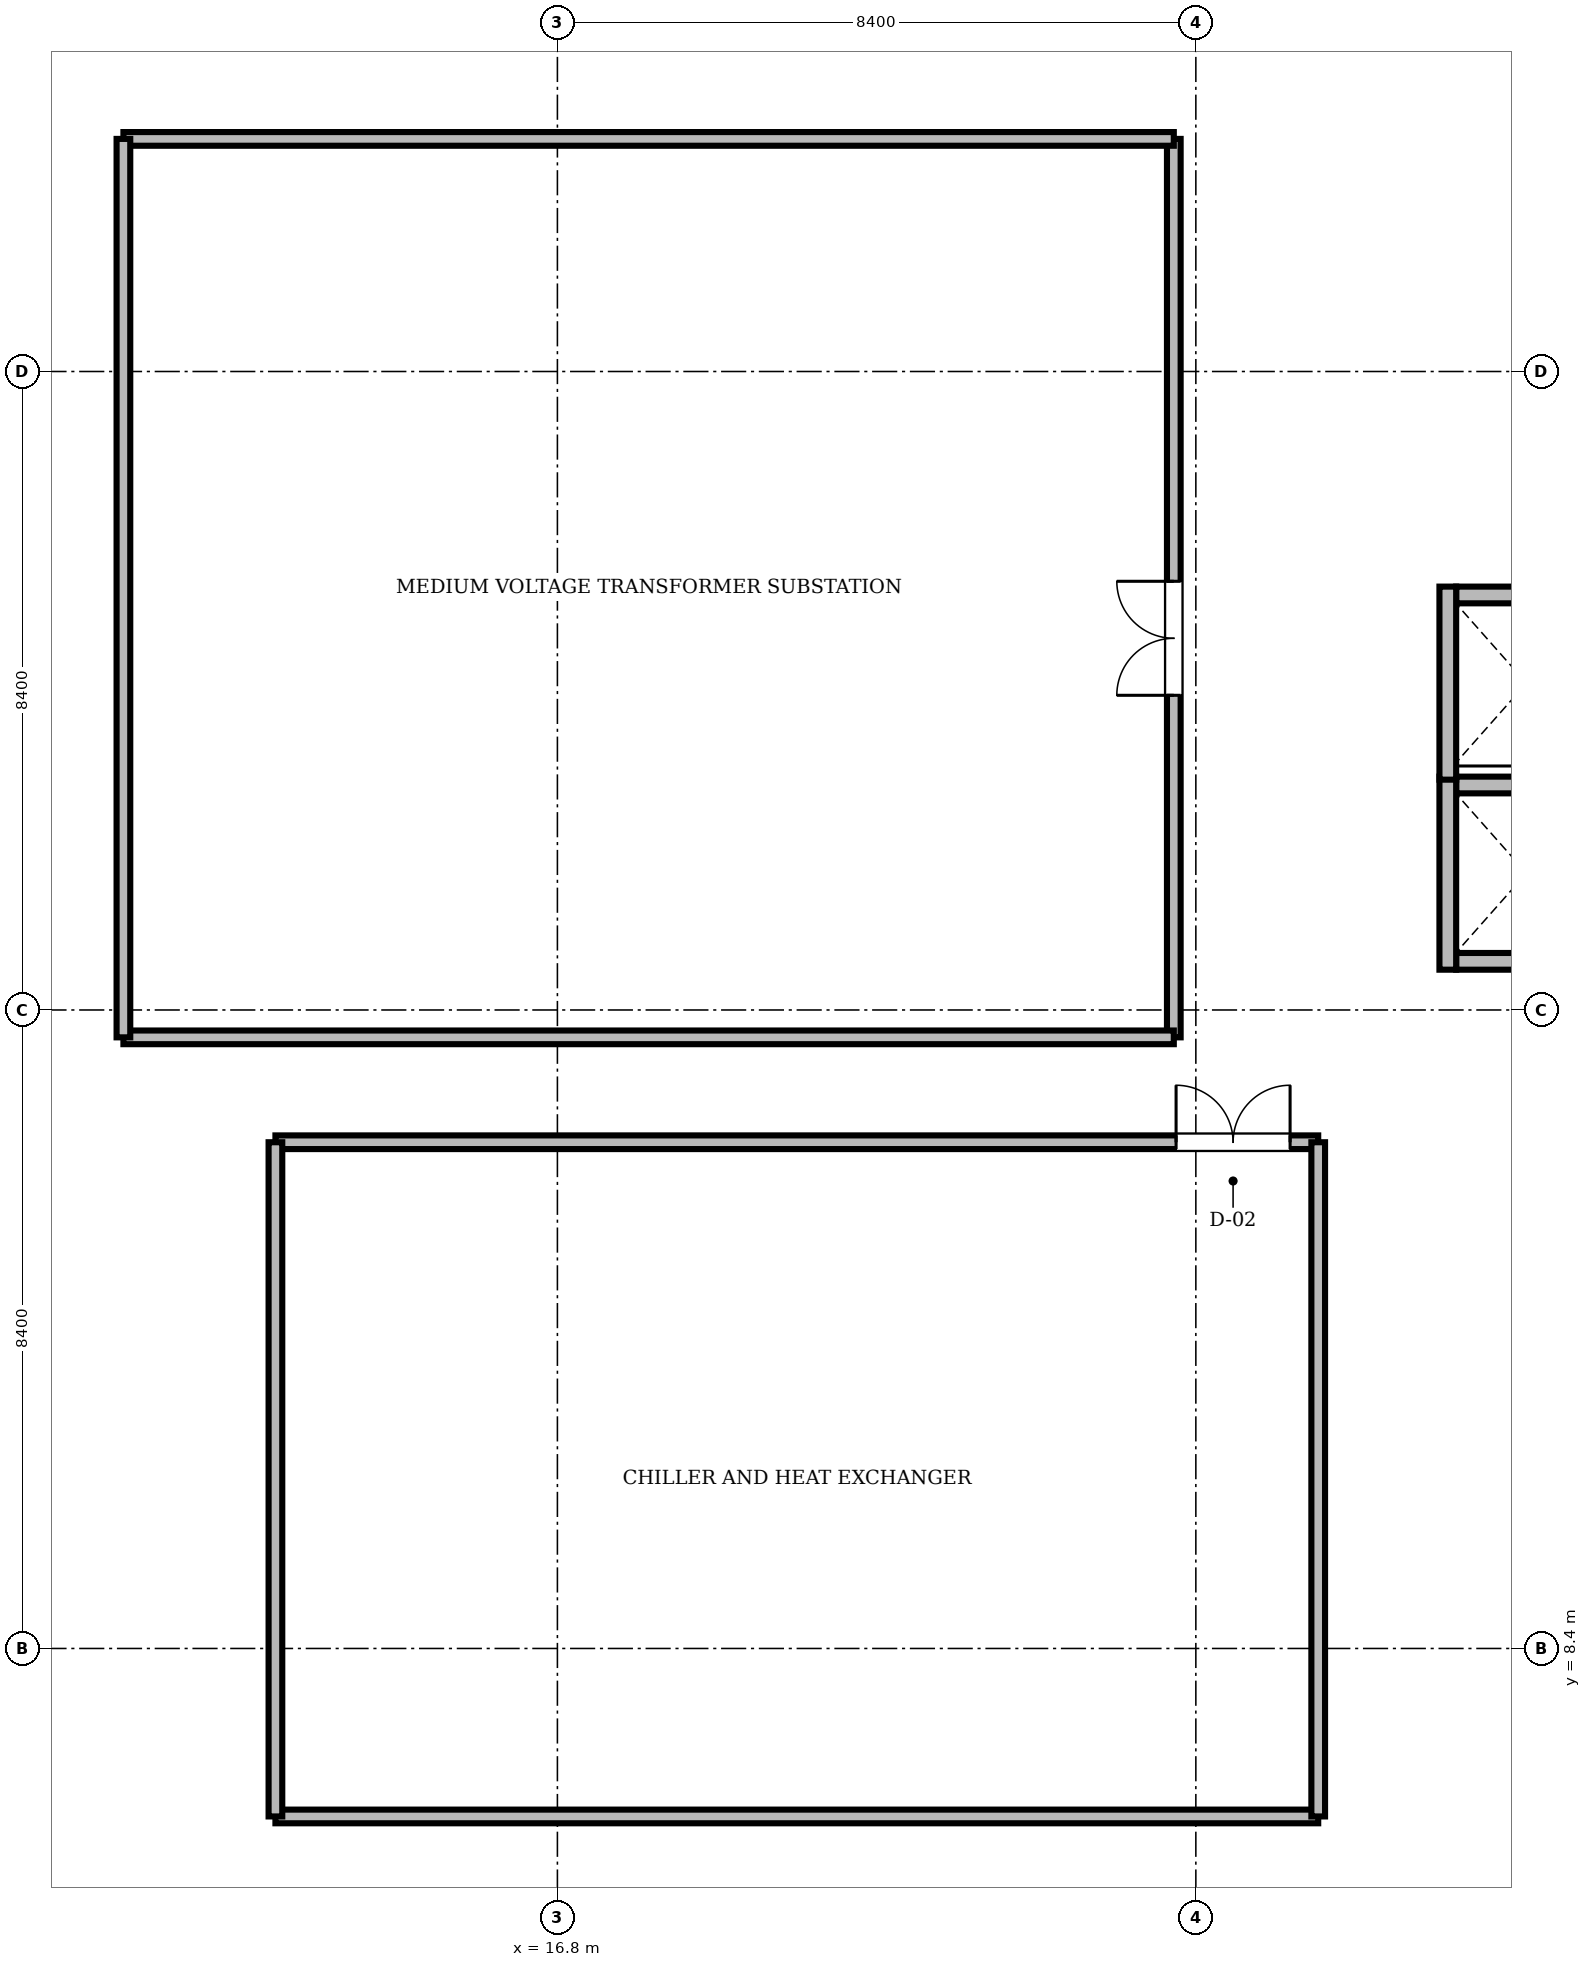
"""IFC4 building model, lengths in metres.
Left out: names, types, materials, properties, quantities, classifications, styles, units other than length and angle.
Written with IfcOpenShell. Run it as: python <this file> out.ifc"""

import sys

from ifc_helpers import new_model, si_unit, direction, frame, frame_2d, origin, origin_2d, place, context, subcontext, project, spatial, rectangle, i_section, extrude, source, transform, mapped, element, fill, save


model = new_model("IFC4")
c1 = context("Model", 3, precision=1e-05, world=origin(), true_north=direction((0.0, 1.0)))
c2 = subcontext(c1, "Body", "Model", "MODEL_VIEW")
j1 = project(units=[si_unit("LENGTHUNIT", "METRE"), si_unit("PLANEANGLEUNIT", "RADIAN")], contexts=[c1])
p1 = place(None, origin())
s1 = spatial("IfcSite", under=j1, at=p1, CompositionType="ELEMENT")
p2 = place(p1, origin())
s2 = spatial("IfcBuilding", under=s1, at=p2, CompositionType="ELEMENT")
p3 = place(p2, frame((0.0, 0.0, 166.8)))
s3 = spatial("IfcBuildingStorey", under=s2, at=p3, CompositionType="ELEMENT", Elevation=166.8)
m1 = source(origin(), c2, "Body", "SweptSolid", [
    extrude(rectangle(XDim=1.6, YDim=1.6, at=origin_2d()), origin(), (0.0, 0.0, 1.0), 6.543),
])
p4 = place(p3, frame((7.75, 13.86, 0.0), z_axis=(0.687744647911, 0.0, 0.725952683906), x_axis=(0.0, 1.0, 0.0)))
e1 = element("IfcColumn", 1, at=p4, inside=s3, PredefinedType="COLUMN", context=c2, shape_type="MappedRepresentation", body=[
    mapped(m1, transform((0.0, 0.0, 0.0), scale=1.0)),
])
m2 = source(origin(), c2, "Body", "SweptSolid", [
    extrude(i_section(OverallWidth=0.414, OverallDepth=0.432, WebThickness=0.026, FlangeThickness=0.04, FilletRadius=0.015, at=origin_2d()), origin(), (0.0, 0.0, 1.0), 6.543),
])
for number, where, z_axis, x_axis in (
    (2, (7.75, 28.9, 0.0), (0.688, 0.0, 0.726), (0.0, 1.0, 0.0)),
    (3, (7.75, 21.5, 0.0), (0.688, 0.0, 0.726), (0.0, 1.0, 0.0)),
    (4, (7.75, 6.95, 0.0), (0.688, 0.0, 0.726), (0.0, 1.0, 0.0)),
):
    element("IfcColumn", number, at=place(p3, frame(where, z_axis=z_axis, x_axis=x_axis)), inside=s3, PredefinedType="COLUMN", context=c2, shape_type="MappedRepresentation", body=[
        mapped(m2, transform((0.0, 0.0, 0.0), scale=1.0)),
    ])
m3 = source(origin(), c2, "Body", "SweptSolid", [
    extrude(rectangle(XDim=1.85, YDim=0.22, at=frame_2d((0.925, 0.0))), origin(), (0.0, 0.0, 1.0), 3.928),
])
p5 = place(p3, frame((28.625, 17.44, 0.0), z_axis=(0.0, 0.0, 1.0), x_axis=(1.0, 0.0, 0.0)))
e5 = element("IfcWall", 5, at=p5, inside=s3, PredefinedType="SOLIDWALL", context=c2, shape_type="MappedRepresentation", body=[
    mapped(m3, transform((0.0, 0.0, 0.0), scale=1.0)),
])
m4 = source(origin(), c2, "Body", "SweptSolid", [
    extrude(rectangle(XDim=1.85, YDim=0.22, at=frame_2d((0.925, 0.0))), origin(), (0.0, 0.0, 1.0), 4.75),
])
p6 = place(p3, frame((28.625, 19.76, 0.0), z_axis=(0.0, 0.0, 1.0), x_axis=(1.0, 0.0, 0.0)))
e6 = element("IfcWall", 6, at=p6, inside=s3, PredefinedType="SOLIDWALL", context=c2, shape_type="MappedRepresentation", body=[
    mapped(m4, transform((0.0, 0.0, 0.0), scale=1.0)),
])
m5 = source(origin(), c2, "Body", "SweptSolid", [
    extrude(rectangle(XDim=2.54, YDim=0.22, at=frame_2d((1.27, 0.0))), origin(), (0.0, 0.0, 1.0), 3.928),
])
p7 = place(p3, frame((28.515, 17.33, 0.0), z_axis=(0.0, 0.0, 1.0), x_axis=(0.0, 1.0, 0.0)))
e7 = element("IfcWall", 7, at=p7, inside=s3, PredefinedType="SOLIDWALL", context=c2, shape_type="MappedRepresentation", body=[
    mapped(m5, transform((0.0, 0.0, 0.0), scale=1.0)),
])
p8 = place(p3, frame((28.625, 22.26, 0.0), z_axis=(0.0, 0.0, 1.0), x_axis=(1.0, 0.0, 0.0)))
e8 = element("IfcWall", 8, at=p8, inside=s3, PredefinedType="SOLIDWALL", context=c2, shape_type="MappedRepresentation", body=[
    mapped(m4, transform((0.0, 0.0, 0.0), scale=1.0)),
])
m6 = source(origin(), c2, "Body", "SweptSolid", [
    extrude(rectangle(XDim=2.54, YDim=0.22, at=frame_2d((1.27, 0.0))), origin(), (0.0, 0.0, 1.0), 4.75),
])
p9 = place(p3, frame((28.515, 19.83, 0.0), z_axis=(0.0, 0.0, 1.0), x_axis=(0.0, 1.0, 0.0)))
e9 = element("IfcWall", 9, at=p9, inside=s3, PredefinedType="SOLIDWALL", context=c2, shape_type="MappedRepresentation", body=[
    mapped(m6, transform((0.0, 0.0, 0.0), scale=1.0)),
])
m7 = source(origin(), c2, "Body", "SweptSolid", [
    extrude(rectangle(XDim=13.72, YDim=0.18, at=frame_2d((6.86, 0.0))), origin(), (0.0, 0.0, 1.0), 3.928),
])
p10 = place(p3, frame((13.09, 15.06, 0.0), z_axis=(0.0, 0.0, 1.0), x_axis=(1.0, 0.0, 0.0)))
e10 = element("IfcWall", 10, at=p10, inside=s3, PredefinedType="PARTITIONING", context=c2, shape_type="MappedRepresentation", body=[
    mapped(m7, transform((0.0, 0.0, 0.0), scale=1.0)),
])
m8 = source(origin(), c2, "Body", "SweptSolid", [
    extrude(rectangle(XDim=1.5, YDim=2.3, at=frame_2d((0.75, 1.15))), frame((0.0, 0.1, 0.0), z_axis=(0.0, -1.0, 0.0), x_axis=(1.0, 0.0, 0.0)), (0.0, 0.0, 1.0), 0.2),
])
p11 = place(p10, frame((11.85, 0.0, 0.0)))
e11 = element("IfcOpeningElement", 11, at=p11, cuts=e10, PredefinedType="OPENING", context=c2, shape_type="MappedRepresentation", body=[
    mapped(m8, transform((0.0, 0.0, 0.0), scale=1.0)),
])
m9 = source(origin(), c2, "Body", "SweptSolid", [
    extrude(rectangle(XDim=11.82, YDim=0.18, at=frame_2d((5.91, 0.0))), origin(), (0.0, 0.0, 1.0), 3.928),
])
p12 = place(p3, frame((24.91, 16.44, 0.0), z_axis=(0.0, 0.0, 1.0), x_axis=(0.0, 1.0, 0.0)))
e12 = element("IfcWall", 12, at=p12, inside=s3, PredefinedType="PARTITIONING", context=c2, shape_type="MappedRepresentation", body=[
    mapped(m9, transform((0.0, 0.0, 0.0), scale=1.0)),
])
p13 = place(p12, frame((4.5, 0.0, 0.0)))
e13 = element("IfcOpeningElement", 13, at=p13, cuts=e12, PredefinedType="OPENING", context=c2, shape_type="MappedRepresentation", body=[
    mapped(m8, transform((0.0, 0.0, 0.0), scale=1.0)),
])
m10 = source(origin(), c2, "Body", "SweptSolid", [
    extrude(rectangle(XDim=13.82, YDim=0.18, at=frame_2d((6.91, 0.0))), origin(), (0.0, 0.0, 1.0), 4.026),
])
p14 = place(p3, frame((11.09, 16.44, 0.0), z_axis=(0.0, 0.0, 1.0), x_axis=(1.0, 0.0, 0.0)))
e14 = element("IfcWall", 14, at=p14, inside=s3, PredefinedType="PARTITIONING", context=c2, shape_type="MappedRepresentation", body=[
    mapped(m10, transform((0.0, 0.0, 0.0), scale=1.0)),
])
m11 = source(origin(), c2, "Body", "SweptSolid", [
    extrude(rectangle(XDim=13.82, YDim=0.18, at=frame_2d((6.91, 0.0))), origin(), (0.0, 0.0, 1.0), 3.928),
])
p15 = place(p3, frame((11.09, 28.26, 0.0), z_axis=(0.0, 0.0, 1.0), x_axis=(1.0, 0.0, 0.0)))
e15 = element("IfcWall", 15, at=p15, inside=s3, PredefinedType="PARTITIONING", context=c2, shape_type="MappedRepresentation", body=[
    mapped(m11, transform((0.0, 0.0, 0.0), scale=1.0)),
])
p16 = place(p3, frame((13.09, 6.19, 0.0), z_axis=(0.0, 0.0, 1.0), x_axis=(1.0, 0.0, 0.0)))
e16 = element("IfcWall", 16, at=p16, inside=s3, PredefinedType="PARTITIONING", context=c2, shape_type="MappedRepresentation", body=[
    mapped(m7, transform((0.0, 0.0, 0.0), scale=1.0)),
])
m12 = source(origin(), c2, "Body", "SweptSolid", [
    extrude(rectangle(XDim=11.82, YDim=0.18, at=frame_2d((5.91, 0.0))), origin(), (0.0, 0.0, 1.0), 4.75),
])
p17 = place(p3, frame((11.09, 16.44, 0.0), z_axis=(0.0, 0.0, 1.0), x_axis=(0.0, 1.0, 0.0)))
e17 = element("IfcWall", 17, at=p17, inside=s3, PredefinedType="PARTITIONING", context=c2, shape_type="MappedRepresentation", body=[
    mapped(m12, transform((0.0, 0.0, 0.0), scale=1.0)),
])
m13 = source(origin(), c2, "Body", "SweptSolid", [
    extrude(rectangle(XDim=8.87, YDim=0.18, at=frame_2d((4.435, 0.0))), origin(), (0.0, 0.0, 1.0), 3.928),
])
for number, where, z_axis, x_axis in (
    (18, (13.09, 6.19, 0.0), (0.0, 0.0, 1.0), (0.0, 1.0, 0.0)),
    (19, (26.81, 6.19, 0.0), (0.0, 0.0, 1.0), (0.0, 1.0, 0.0)),
):
    element("IfcWall", number, at=place(p3, frame(where, z_axis=z_axis, x_axis=x_axis)), inside=s3, PredefinedType="PARTITIONING", context=c2, shape_type="MappedRepresentation", body=[
        mapped(m13, transform((0.0, 0.0, 0.0), scale=1.0)),
    ])
m14 = source(origin(), c2, "Body", "SweptSolid", [
    extrude(rectangle(XDim=1.5, YDim=2.3, at=frame_2d((0.75, 1.15))), frame((0.0, 0.025, 0.0), z_axis=(0.0, -1.0, 0.0), x_axis=(1.0, 0.0, 0.0)), (0.0, 0.0, 1.0), 0.05),
])
p18 = place(p11, origin())
e20 = element("IfcDoor", 20, at=p18, inside=s3, OperationType="DOUBLE_DOOR_SINGLE_SWING", PredefinedType="DOOR", context=c2, shape_type="MappedRepresentation", body=[
    mapped(m14, transform((0.0, 0.0, 0.0), scale=1.0)),
])
fill(e11, e20)
p19 = place(p13, origin())
e21 = element("IfcDoor", 21, at=p19, inside=s3, OperationType="DOUBLE_DOOR_SINGLE_SWING", PredefinedType="DOOR", context=c2, shape_type="MappedRepresentation", body=[
    mapped(m14, transform((0.0, 0.0, 0.0), scale=1.0)),
])
fill(e13, e21)
save(model, sys.argv[1])
